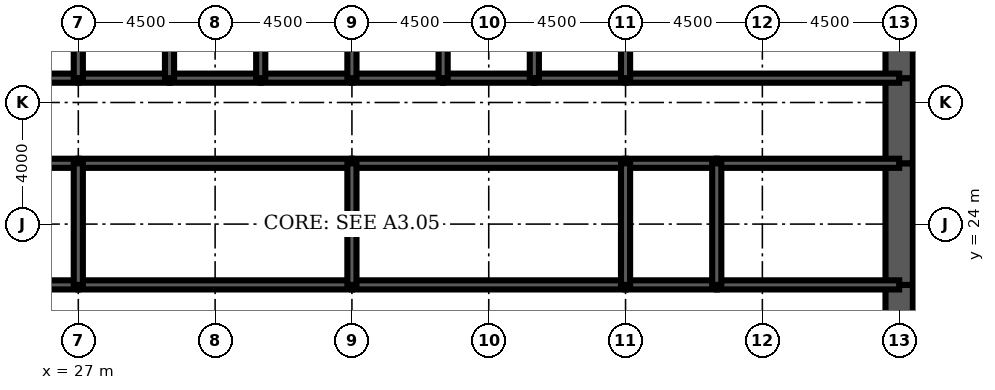
"""IFC4 building model, lengths in metres.
Left out: names, types, materials, properties, quantities, classifications, styles, units other than length and angle.
Written with IfcOpenShell. Run it as: python <this file> out.ifc"""

import sys

from ifc_helpers import new_model, si_unit, direction, frame, frame_2d, origin, place, context, subcontext, project, spatial, rectangle, extrude, element, fill, save


model = new_model("IFC4")
c1 = context("Model", 3, precision=1e-05, world=origin(), true_north=direction((0.0, 1.0)))
c2 = subcontext(c1, "Body", "Model", "MODEL_VIEW")
j1 = project(units=[si_unit("LENGTHUNIT", "METRE"), si_unit("PLANEANGLEUNIT", "RADIAN")], contexts=[c1])
p1 = place(None, origin())
s1 = spatial("IfcSite", under=j1, at=p1, CompositionType="ELEMENT")
p2 = place(p1, origin())
s2 = spatial("IfcBuilding", under=s1, at=p2, CompositionType="ELEMENT")
p3 = place(p2, frame((0.0, 0.0, 18.0)))
s3 = spatial("IfcBuildingStorey", under=s2, at=p3, CompositionType="ELEMENT", Elevation=18.0)
p4 = place(p3, frame((54.0, 19.2, 0.0), z_axis=(0.0, 0.0, 1.0), x_axis=(0.0, 1.0, 0.0)))
e1 = element("IfcWall", 1, at=p4, inside=s3, PredefinedType="SHEAR", context=c2, shape_type="SweptSolid", body=[
    extrude(rectangle(XDim=2.8, YDim=0.9, at=frame_2d((1.4, 0.0))), origin(), (0.0, 0.0, 1.0), 5.0),
])
p5 = place(p4, frame((0.4, 0.0, 0.0)))
e2 = element("IfcOpeningElement", 2, at=p5, cuts=e1, PredefinedType="OPENING", context=c2, shape_type="SweptSolid", body=[
    extrude(rectangle(XDim=1.8, YDim=2.1, at=frame_2d((0.9, 1.05))), frame((0.0, 0.46, 0.0), z_axis=(0.0, -1.0, 0.0), x_axis=(1.0, 0.0, 0.0)), (0.0, 0.0, 1.0), 0.92),
])
p6 = place(p3, frame((54.0, 22.0, 0.0), z_axis=(0.0, 0.0, 1.0), x_axis=(0.0, 1.0, 0.0)))
e3 = element("IfcWall", 3, at=p6, inside=s3, PredefinedType="SHEAR", context=c2, shape_type="SweptSolid", body=[
    extrude(rectangle(XDim=4.0, YDim=0.9, at=frame_2d((2.0, 0.0))), origin(), (0.0, 0.0, 1.0), 5.0),
])
p7 = place(p3, frame((54.0, 26.0, 0.0), z_axis=(0.0, 0.0, 1.0), x_axis=(0.0, 1.0, 0.0)))
e4 = element("IfcWall", 4, at=p7, inside=s3, PredefinedType="SHEAR", context=c2, shape_type="SweptSolid", body=[
    extrude(rectangle(XDim=2.8, YDim=0.9, at=frame_2d((1.4, 0.0))), origin(), (0.0, 0.0, 1.0), 5.0),
])
p8 = place(p7, frame((0.6, 0.0, 0.0)))
e5 = element("IfcOpeningElement", 5, at=p8, cuts=e4, PredefinedType="OPENING", context=c2, shape_type="SweptSolid", body=[
    extrude(rectangle(XDim=1.8, YDim=2.1, at=frame_2d((0.9, 1.05))), frame((0.0, 0.46, 0.0), z_axis=(0.0, -1.0, 0.0), x_axis=(1.0, 0.0, 0.0)), (0.0, 0.0, 1.0), 0.92),
])
p9 = place(p3, frame((54.0, 28.8, 0.0), z_axis=(0.0, 0.0, 1.0), x_axis=(0.0, 1.0, 0.0)))
e6 = element("IfcWall", 6, at=p9, inside=s3, PredefinedType="SHEAR", context=c2, shape_type="SweptSolid", body=[
    extrude(rectangle(XDim=3.2, YDim=0.9, at=frame_2d((1.6, 0.0))), origin(), (0.0, 0.0, 1.0), 5.0),
])
p10 = place(p3, frame((18.0, 28.8, 0.0), z_axis=(0.0, 0.0, 1.0), x_axis=(1.0, 0.0, 0.0)))
e7 = element("IfcWall", 7, at=p10, inside=s3, PredefinedType="SOLIDWALL", context=c2, shape_type="SweptSolid", body=[
    extrude(rectangle(XDim=9.0, YDim=0.3, at=frame_2d((4.5, 0.0))), origin(), (0.0, 0.0, 1.0), 5.0),
])
p11 = place(p10, frame((0.65, 0.0, 0.0)))
e8 = element("IfcOpeningElement", 8, at=p11, cuts=e7, PredefinedType="OPENING", context=c2, shape_type="SweptSolid", body=[
    extrude(rectangle(XDim=1.0, YDim=2.1, at=frame_2d((0.5, 1.05))), frame((0.0, 0.16, 0.0), z_axis=(0.0, -1.0, 0.0), x_axis=(1.0, 0.0, 0.0)), (0.0, 0.0, 1.0), 0.32),
])
p12 = place(p3, frame((27.0, 28.8, 0.0), z_axis=(0.0, 0.0, 1.0), x_axis=(1.0, 0.0, 0.0)))
e9 = element("IfcWall", 9, at=p12, inside=s3, PredefinedType="SOLIDWALL", context=c2, shape_type="SweptSolid", body=[
    extrude(rectangle(XDim=3.0, YDim=0.3, at=frame_2d((1.5, 0.0))), origin(), (0.0, 0.0, 1.0), 5.0),
])
p13 = place(p12, frame((0.95, 0.0, 0.0)))
e10 = element("IfcOpeningElement", 10, at=p13, cuts=e9, PredefinedType="OPENING", context=c2, shape_type="SweptSolid", body=[
    extrude(rectangle(XDim=1.1, YDim=2.2, at=frame_2d((0.55, 1.1))), frame((0.0, 0.16, 0.0), z_axis=(0.0, -1.0, 0.0), x_axis=(1.0, 0.0, 0.0)), (0.0, 0.0, 1.0), 0.32),
])
p14 = place(p3, frame((30.0, 28.8, 0.0), z_axis=(0.0, 0.0, 1.0), x_axis=(1.0, 0.0, 0.0)))
e11 = element("IfcWall", 11, at=p14, inside=s3, PredefinedType="SOLIDWALL", context=c2, shape_type="SweptSolid", body=[
    extrude(rectangle(XDim=3.0, YDim=0.3, at=frame_2d((1.5, 0.0))), origin(), (0.0, 0.0, 1.0), 5.0),
])
p15 = place(p14, frame((0.95, 0.0, 0.0)))
e12 = element("IfcOpeningElement", 12, at=p15, cuts=e11, PredefinedType="OPENING", context=c2, shape_type="SweptSolid", body=[
    extrude(rectangle(XDim=1.1, YDim=2.2, at=frame_2d((0.55, 1.1))), frame((0.0, 0.16, 0.0), z_axis=(0.0, -1.0, 0.0), x_axis=(1.0, 0.0, 0.0)), (0.0, 0.0, 1.0), 0.32),
])
p16 = place(p3, frame((33.0, 28.8, 0.0), z_axis=(0.0, 0.0, 1.0), x_axis=(1.0, 0.0, 0.0)))
e13 = element("IfcWall", 13, at=p16, inside=s3, PredefinedType="SOLIDWALL", context=c2, shape_type="SweptSolid", body=[
    extrude(rectangle(XDim=3.0, YDim=0.3, at=frame_2d((1.5, 0.0))), origin(), (0.0, 0.0, 1.0), 5.0),
])
p17 = place(p16, frame((0.95, 0.0, 0.0)))
e14 = element("IfcOpeningElement", 14, at=p17, cuts=e13, PredefinedType="OPENING", context=c2, shape_type="SweptSolid", body=[
    extrude(rectangle(XDim=1.1, YDim=2.2, at=frame_2d((0.55, 1.1))), frame((0.0, 0.16, 0.0), z_axis=(0.0, -1.0, 0.0), x_axis=(1.0, 0.0, 0.0)), (0.0, 0.0, 1.0), 0.32),
])
for number, where, z_axis, x_axis in (
    (15, (36.0, 28.8, 0.0), (0.0, 0.0, 1.0), (1.0, 0.0, 0.0)),
    (16, (39.0, 28.8, 0.0), (0.0, 0.0, 1.0), (1.0, 0.0, 0.0)),
):
    element("IfcWall", number, at=place(p3, frame(where, z_axis=z_axis, x_axis=x_axis)), inside=s3, PredefinedType="SOLIDWALL", context=c2, shape_type="SweptSolid", body=[
        extrude(rectangle(XDim=3.0, YDim=0.3, at=frame_2d((1.5, 0.0))), origin(), (0.0, 0.0, 1.0), 5.0),
    ])
p18 = place(p3, frame((42.0, 28.8, 0.0), z_axis=(0.0, 0.0, 1.0), x_axis=(1.0, 0.0, 0.0)))
e17 = element("IfcWall", 17, at=p18, inside=s3, PredefinedType="SOLIDWALL", context=c2, shape_type="SweptSolid", body=[
    extrude(rectangle(XDim=3.0, YDim=0.3, at=frame_2d((1.5, 0.0))), origin(), (0.0, 0.0, 1.0), 5.0),
])
p19 = place(p18, frame((0.95, 0.0, 0.0)))
e18 = element("IfcOpeningElement", 18, at=p19, cuts=e17, PredefinedType="OPENING", context=c2, shape_type="SweptSolid", body=[
    extrude(rectangle(XDim=1.1, YDim=2.2, at=frame_2d((0.55, 1.1))), frame((0.0, 0.16, 0.0), z_axis=(0.0, -1.0, 0.0), x_axis=(1.0, 0.0, 0.0)), (0.0, 0.0, 1.0), 0.32),
])
p20 = place(p3, frame((45.0, 28.8, 0.0), z_axis=(0.0, 0.0, 1.0), x_axis=(1.0, 0.0, 0.0)))
e19 = element("IfcWall", 19, at=p20, inside=s3, PredefinedType="SOLIDWALL", context=c2, shape_type="SweptSolid", body=[
    extrude(rectangle(XDim=9.0, YDim=0.3, at=frame_2d((4.5, 0.0))), origin(), (0.0, 0.0, 1.0), 5.0),
])
p21 = place(p20, frame((7.35, 0.0, 0.0)))
e20 = element("IfcOpeningElement", 20, at=p21, cuts=e19, PredefinedType="OPENING", context=c2, shape_type="SweptSolid", body=[
    extrude(rectangle(XDim=1.0, YDim=2.1, at=frame_2d((0.5, 1.05))), frame((0.0, 0.16, 0.0), z_axis=(0.0, -1.0, 0.0), x_axis=(1.0, 0.0, 0.0)), (0.0, 0.0, 1.0), 0.32),
])
p22 = place(p3, frame((24.0, 22.0, 0.0), z_axis=(0.0, 0.0, 1.0), x_axis=(1.0, 0.0, 0.0)))
e21 = element("IfcWall", 21, at=p22, inside=s3, PredefinedType="SOLIDWALL", context=c2, shape_type="SweptSolid", body=[
    extrude(rectangle(XDim=3.0, YDim=0.3, at=frame_2d((1.5, 0.0))), origin(), (0.0, 0.0, 1.0), 5.0),
])
p23 = place(p22, frame((1.0, 0.0, 0.0)))
e22 = element("IfcOpeningElement", 22, at=p23, cuts=e21, PredefinedType="OPENING", context=c2, shape_type="SweptSolid", body=[
    extrude(rectangle(XDim=1.0, YDim=2.1, at=frame_2d((0.5, 1.05))), frame((0.0, 0.16, 0.0), z_axis=(0.0, -1.0, 0.0), x_axis=(1.0, 0.0, 0.0)), (0.0, 0.0, 1.0), 0.32),
])
p24 = place(p3, frame((27.0, 22.0, 0.0), z_axis=(0.0, 0.0, 1.0), x_axis=(1.0, 0.0, 0.0)))
e23 = element("IfcWall", 23, at=p24, inside=s3, PredefinedType="SOLIDWALL", context=c2, shape_type="SweptSolid", body=[
    extrude(rectangle(XDim=9.0, YDim=0.3, at=frame_2d((4.5, 0.0))), origin(), (0.0, 0.0, 1.0), 5.0),
])
p25 = place(p24, frame((4.0, 0.0, 0.0)))
e24 = element("IfcOpeningElement", 24, at=p25, cuts=e23, PredefinedType="OPENING", context=c2, shape_type="SweptSolid", body=[
    extrude(rectangle(XDim=1.0, YDim=2.1, at=frame_2d((0.5, 1.05))), frame((0.0, 0.16, 0.0), z_axis=(0.0, -1.0, 0.0), x_axis=(1.0, 0.0, 0.0)), (0.0, 0.0, 1.0), 0.32),
])
p26 = place(p3, frame((36.0, 22.0, 0.0), z_axis=(0.0, 0.0, 1.0), x_axis=(1.0, 0.0, 0.0)))
e25 = element("IfcWall", 25, at=p26, inside=s3, PredefinedType="SOLIDWALL", context=c2, shape_type="SweptSolid", body=[
    extrude(rectangle(XDim=9.0, YDim=0.3, at=frame_2d((4.5, 0.0))), origin(), (0.0, 0.0, 1.0), 5.0),
])
p27 = place(p26, frame((4.0, 0.0, 0.0)))
e26 = element("IfcOpeningElement", 26, at=p27, cuts=e25, PredefinedType="OPENING", context=c2, shape_type="SweptSolid", body=[
    extrude(rectangle(XDim=1.0, YDim=2.1, at=frame_2d((0.5, 1.05))), frame((0.0, 0.16, 0.0), z_axis=(0.0, -1.0, 0.0), x_axis=(1.0, 0.0, 0.0)), (0.0, 0.0, 1.0), 0.32),
])
p28 = place(p3, frame((45.0, 22.0, 0.0), z_axis=(0.0, 0.0, 1.0), x_axis=(1.0, 0.0, 0.0)))
e27 = element("IfcWall", 27, at=p28, inside=s3, PredefinedType="SOLIDWALL", context=c2, shape_type="SweptSolid", body=[
    extrude(rectangle(XDim=3.0, YDim=0.3, at=frame_2d((1.5, 0.0))), origin(), (0.0, 0.0, 1.0), 5.0),
])
p29 = place(p28, frame((1.0, 0.0, 0.0)))
e28 = element("IfcOpeningElement", 28, at=p29, cuts=e27, PredefinedType="OPENING", context=c2, shape_type="SweptSolid", body=[
    extrude(rectangle(XDim=1.0, YDim=2.1, at=frame_2d((0.5, 1.05))), frame((0.0, 0.16, 0.0), z_axis=(0.0, -1.0, 0.0), x_axis=(1.0, 0.0, 0.0)), (0.0, 0.0, 1.0), 0.32),
])
p30 = place(p3, frame((48.0, 22.0, 0.0), z_axis=(0.0, 0.0, 1.0), x_axis=(1.0, 0.0, 0.0)))
e29 = element("IfcWall", 29, at=p30, inside=s3, PredefinedType="SOLIDWALL", context=c2, shape_type="SweptSolid", body=[
    extrude(rectangle(XDim=6.0, YDim=0.3, at=frame_2d((3.0, 0.0))), origin(), (0.0, 0.0, 1.0), 5.0),
])
p31 = place(p30, frame((2.0, 0.0, 0.0)))
e30 = element("IfcOpeningElement", 30, at=p31, cuts=e29, PredefinedType="OPENING", context=c2, shape_type="SweptSolid", body=[
    extrude(rectangle(XDim=1.0, YDim=2.1, at=frame_2d((0.5, 1.05))), frame((0.0, 0.16, 0.0), z_axis=(0.0, -1.0, 0.0), x_axis=(1.0, 0.0, 0.0)), (0.0, 0.0, 1.0), 0.32),
])
p32 = place(p30, frame((4.0, 0.0, 0.0)))
e31 = element("IfcOpeningElement", 31, at=p32, cuts=e29, PredefinedType="OPENING", context=c2, shape_type="SweptSolid", body=[
    extrude(rectangle(XDim=1.0, YDim=2.1, at=frame_2d((0.5, 1.05))), frame((0.0, 0.16, 0.0), z_axis=(0.0, -1.0, 0.0), x_axis=(1.0, 0.0, 0.0)), (0.0, 0.0, 1.0), 0.32),
])
p33 = place(p3, frame((24.0, 26.0, 0.0), z_axis=(0.0, 0.0, 1.0), x_axis=(1.0, 0.0, 0.0)))
e32 = element("IfcWall", 32, at=p33, inside=s3, PredefinedType="SOLIDWALL", context=c2, shape_type="SweptSolid", body=[
    extrude(rectangle(XDim=3.0, YDim=0.3, at=frame_2d((1.5, 0.0))), origin(), (0.0, 0.0, 1.0), 5.0),
])
for number, where, z_axis, x_axis in (
    (33, (27.0, 26.0, 0.0), (0.0, 0.0, 1.0), (1.0, 0.0, 0.0)),
    (34, (36.0, 26.0, 0.0), (0.0, 0.0, 1.0), (1.0, 0.0, 0.0)),
):
    element("IfcWall", number, at=place(p3, frame(where, z_axis=z_axis, x_axis=x_axis)), inside=s3, PredefinedType="SOLIDWALL", context=c2, shape_type="SweptSolid", body=[
        extrude(rectangle(XDim=9.0, YDim=0.3, at=frame_2d((4.5, 0.0))), origin(), (0.0, 0.0, 1.0), 5.0),
    ])
p34 = place(p3, frame((45.0, 26.0, 0.0), z_axis=(0.0, 0.0, 1.0), x_axis=(1.0, 0.0, 0.0)))
e35 = element("IfcWall", 35, at=p34, inside=s3, PredefinedType="SOLIDWALL", context=c2, shape_type="SweptSolid", body=[
    extrude(rectangle(XDim=3.0, YDim=0.3, at=frame_2d((1.5, 0.0))), origin(), (0.0, 0.0, 1.0), 5.0),
])
p35 = place(p3, frame((48.0, 26.0, 0.0), z_axis=(0.0, 0.0, 1.0), x_axis=(1.0, 0.0, 0.0)))
e36 = element("IfcWall", 36, at=p35, inside=s3, PredefinedType="SOLIDWALL", context=c2, shape_type="SweptSolid", body=[
    extrude(rectangle(XDim=6.0, YDim=0.3, at=frame_2d((3.0, 0.0))), origin(), (0.0, 0.0, 1.0), 5.0),
])
for number, where, z_axis, x_axis in (
    (37, (27.0, 28.8, 0.0), (0.0, 0.0, 1.0), (0.0, 1.0, 0.0)),
    (38, (30.0, 28.8, 0.0), (0.0, 0.0, 1.0), (0.0, 1.0, 0.0)),
    (39, (33.0, 28.8, 0.0), (0.0, 0.0, 1.0), (0.0, 1.0, 0.0)),
    (40, (36.0, 28.8, 0.0), (0.0, 0.0, 1.0), (0.0, 1.0, 0.0)),
    (41, (39.0, 28.8, 0.0), (0.0, 0.0, 1.0), (0.0, 1.0, 0.0)),
    (42, (42.0, 28.8, 0.0), (0.0, 0.0, 1.0), (0.0, 1.0, 0.0)),
    (43, (45.0, 28.8, 0.0), (0.0, 0.0, 1.0), (0.0, 1.0, 0.0)),
):
    element("IfcWall", number, at=place(p3, frame(where, z_axis=z_axis, x_axis=x_axis)), inside=s3, PredefinedType="SOLIDWALL", context=c2, shape_type="SweptSolid", body=[
        extrude(rectangle(XDim=3.2, YDim=0.3, at=frame_2d((1.6, 0.0))), origin(), (0.0, 0.0, 1.0), 5.0),
    ])
for number, where, z_axis, x_axis in (
    (44, (27.0, 22.0, 0.0), (0.0, 0.0, 1.0), (0.0, 1.0, 0.0)),
    (45, (36.0, 22.0, 0.0), (0.0, 0.0, 1.0), (0.0, 1.0, 0.0)),
    (46, (45.0, 22.0, 0.0), (0.0, 0.0, 1.0), (0.0, 1.0, 0.0)),
    (47, (48.0, 22.0, 0.0), (0.0, 0.0, 1.0), (0.0, 1.0, 0.0)),
):
    element("IfcWall", number, at=place(p3, frame(where, z_axis=z_axis, x_axis=x_axis)), inside=s3, PredefinedType="SOLIDWALL", context=c2, shape_type="SweptSolid", body=[
        extrude(rectangle(XDim=4.0, YDim=0.3, at=frame_2d((2.0, 0.0))), origin(), (0.0, 0.0, 1.0), 5.0),
    ])
p36 = place(p3, frame((42.5, 22.15, 0.0), z_axis=(0.0, 0.0, 1.0), x_axis=(0.0, 1.0, 0.0)))
e48 = element("IfcWall", 48, at=p36, inside=s3, PredefinedType="PARTITIONING", context=c2, shape_type="SweptSolid", body=[
    extrude(rectangle(XDim=3.7, YDim=0.15, at=frame_2d((1.85, 0.0))), origin(), (0.0, 0.0, 1.0), 3.0),
])
p37 = place(p36, frame((2.2, 0.0, 0.0)))
e49 = element("IfcOpeningElement", 49, at=p37, cuts=e48, PredefinedType="OPENING", context=c2, shape_type="SweptSolid", body=[
    extrude(rectangle(XDim=1.0, YDim=2.1, at=frame_2d((0.5, 1.05))), frame((0.0, 0.085, 0.0), z_axis=(0.0, -1.0, 0.0), x_axis=(1.0, 0.0, 0.0)), (0.0, 0.0, 1.0), 0.17),
])
p38 = place(p3, frame((51.375, 22.15, 0.0), z_axis=(0.0, 0.0, 1.0), x_axis=(0.0, 1.0, 0.0)))
e50 = element("IfcWall", 50, at=p38, inside=s3, PredefinedType="PARTITIONING", context=c2, shape_type="SweptSolid", body=[
    extrude(rectangle(XDim=3.7, YDim=0.15, at=frame_2d((1.85, 0.0))), origin(), (0.0, 0.0, 1.0), 3.0),
])
p39 = place(p3, frame((46.2, 26.15, 0.0), z_axis=(0.0, 0.0, 1.0), x_axis=(0.0, 1.0, 0.0)))
e51 = element("IfcWall", 51, at=p39, inside=s3, PredefinedType="PARTITIONING", context=c2, shape_type="SweptSolid", body=[
    extrude(rectangle(XDim=2.5, YDim=0.15, at=frame_2d((1.25, 0.0))), origin(), (0.0, 0.0, 1.0), 3.0),
])
p40 = place(p39, frame((1.15, 0.0, 0.0)))
e52 = element("IfcOpeningElement", 52, at=p40, cuts=e51, PredefinedType="OPENING", context=c2, shape_type="SweptSolid", body=[
    extrude(rectangle(XDim=1.0, YDim=2.1, at=frame_2d((0.5, 1.05))), frame((0.0, 0.085, 0.0), z_axis=(0.0, -1.0, 0.0), x_axis=(1.0, 0.0, 0.0)), (0.0, 0.0, 1.0), 0.17),
])
p41 = place(p37, origin())
e53 = element("IfcDoor", 53, at=p41, inside=s3, OperationType="SINGLE_SWING_RIGHT", PredefinedType="DOOR", context=c2, shape_type="SweptSolid", body=[
    extrude(rectangle(XDim=1.0, YDim=2.1, at=frame_2d((0.5, 1.05))), frame((0.0, 0.025, 0.0), z_axis=(0.0, -1.0, 0.0), x_axis=(1.0, 0.0, 0.0)), (0.0, 0.0, 1.0), 0.05),
])
fill(e49, e53)
p42 = place(p40, origin())
e54 = element("IfcDoor", 54, at=p42, inside=s3, OperationType="SINGLE_SWING_RIGHT", PredefinedType="DOOR", context=c2, shape_type="SweptSolid", body=[
    extrude(rectangle(XDim=1.0, YDim=2.1, at=frame_2d((0.5, 1.05))), frame((0.0, 0.025, 0.0), z_axis=(0.0, -1.0, 0.0), x_axis=(1.0, 0.0, 0.0)), (0.0, 0.0, 1.0), 0.05),
])
fill(e52, e54)
p43 = place(p19, origin())
e55 = element("IfcDoor", 55, at=p43, inside=s3, OperationType="DOUBLE_DOOR_SLIDING", PredefinedType="USERDEFINED", context=c2, shape_type="SweptSolid", body=[
    extrude(rectangle(XDim=1.1, YDim=2.2, at=frame_2d((0.55, 1.1))), frame((0.0, 0.025, 0.0), z_axis=(0.0, -1.0, 0.0), x_axis=(1.0, 0.0, 0.0)), (0.0, 0.0, 1.0), 0.05),
])
fill(e18, e55)
p44 = place(p13, origin())
e56 = element("IfcDoor", 56, at=p44, inside=s3, OperationType="DOUBLE_DOOR_SLIDING", PredefinedType="USERDEFINED", context=c2, shape_type="SweptSolid", body=[
    extrude(rectangle(XDim=1.1, YDim=2.2, at=frame_2d((0.55, 1.1))), frame((0.0, 0.025, 0.0), z_axis=(0.0, -1.0, 0.0), x_axis=(1.0, 0.0, 0.0)), (0.0, 0.0, 1.0), 0.05),
])
fill(e10, e56)
p45 = place(p15, origin())
e57 = element("IfcDoor", 57, at=p45, inside=s3, OperationType="DOUBLE_DOOR_SLIDING", PredefinedType="USERDEFINED", context=c2, shape_type="SweptSolid", body=[
    extrude(rectangle(XDim=1.1, YDim=2.2, at=frame_2d((0.55, 1.1))), frame((0.0, 0.025, 0.0), z_axis=(0.0, -1.0, 0.0), x_axis=(1.0, 0.0, 0.0)), (0.0, 0.0, 1.0), 0.05),
])
fill(e12, e57)
p46 = place(p17, origin())
e58 = element("IfcDoor", 58, at=p46, inside=s3, OperationType="DOUBLE_DOOR_SLIDING", PredefinedType="USERDEFINED", context=c2, shape_type="SweptSolid", body=[
    extrude(rectangle(XDim=1.1, YDim=2.2, at=frame_2d((0.55, 1.1))), frame((0.0, 0.025, 0.0), z_axis=(0.0, -1.0, 0.0), x_axis=(1.0, 0.0, 0.0)), (0.0, 0.0, 1.0), 0.05),
])
fill(e14, e58)
p47 = place(p21, origin())
e59 = element("IfcDoor", 59, at=p47, inside=s3, OperationType="SINGLE_SWING_RIGHT", PredefinedType="DOOR", context=c2, shape_type="SweptSolid", body=[
    extrude(rectangle(XDim=1.0, YDim=2.1, at=frame_2d((0.5, 1.05))), frame((0.0, 0.025, 0.0), z_axis=(0.0, -1.0, 0.0), x_axis=(1.0, 0.0, 0.0)), (0.0, 0.0, 1.0), 0.05),
])
fill(e20, e59)
p48 = place(p5, origin())
e60 = element("IfcDoor", 60, at=p48, inside=s3, OperationType="SINGLE_SWING_LEFT", PredefinedType="DOOR", context=c2, shape_type="SweptSolid", body=[
    extrude(rectangle(XDim=1.8, YDim=2.1, at=frame_2d((0.9, 1.05))), frame((0.0, 0.45, 0.0), z_axis=(0.0, -1.0, 0.0), x_axis=(1.0, 0.0, 0.0)), (0.0, 0.0, 1.0), 0.899),
])
fill(e2, e60)
p49 = place(p8, origin())
e61 = element("IfcDoor", 61, at=p49, inside=s3, OperationType="SINGLE_SWING_LEFT", PredefinedType="DOOR", context=c2, shape_type="SweptSolid", body=[
    extrude(rectangle(XDim=1.8, YDim=2.1, at=frame_2d((0.9, 1.05))), frame((0.0, 0.45, 0.0), z_axis=(0.0, -1.0, 0.0), x_axis=(1.0, 0.0, 0.0)), (0.0, 0.0, 1.0), 0.899),
])
fill(e5, e61)
p50 = place(p25, origin())
e62 = element("IfcDoor", 62, at=p50, inside=s3, OperationType="SINGLE_SWING_LEFT", PredefinedType="DOOR", context=c2, shape_type="SweptSolid", body=[
    extrude(rectangle(XDim=1.0, YDim=2.1, at=frame_2d((0.5, 1.05))), frame((0.0, 0.025, 0.0), z_axis=(0.0, -1.0, 0.0), x_axis=(1.0, 0.0, 0.0)), (0.0, 0.0, 1.0), 0.05),
])
fill(e24, e62)
p51 = place(p27, origin())
e63 = element("IfcDoor", 63, at=p51, inside=s3, OperationType="SINGLE_SWING_LEFT", PredefinedType="DOOR", context=c2, shape_type="SweptSolid", body=[
    extrude(rectangle(XDim=1.0, YDim=2.1, at=frame_2d((0.5, 1.05))), frame((0.0, 0.025, 0.0), z_axis=(0.0, -1.0, 0.0), x_axis=(1.0, 0.0, 0.0)), (0.0, 0.0, 1.0), 0.05),
])
fill(e26, e63)
p52 = place(p29, origin())
e64 = element("IfcDoor", 64, at=p52, inside=s3, OperationType="SINGLE_SWING_LEFT", PredefinedType="DOOR", context=c2, shape_type="SweptSolid", body=[
    extrude(rectangle(XDim=1.0, YDim=2.1, at=frame_2d((0.5, 1.05))), frame((0.0, 0.025, 0.0), z_axis=(0.0, -1.0, 0.0), x_axis=(1.0, 0.0, 0.0)), (0.0, 0.0, 1.0), 0.05),
])
fill(e28, e64)
p53 = place(p31, origin())
e65 = element("IfcDoor", 65, at=p53, inside=s3, OperationType="SINGLE_SWING_LEFT", PredefinedType="DOOR", context=c2, shape_type="SweptSolid", body=[
    extrude(rectangle(XDim=1.0, YDim=2.1, at=frame_2d((0.5, 1.05))), frame((0.0, 0.025, 0.0), z_axis=(0.0, -1.0, 0.0), x_axis=(1.0, 0.0, 0.0)), (0.0, 0.0, 1.0), 0.05),
])
fill(e30, e65)
p54 = place(p32, origin())
e66 = element("IfcDoor", 66, at=p54, inside=s3, OperationType="SINGLE_SWING_RIGHT", PredefinedType="DOOR", context=c2, shape_type="SweptSolid", body=[
    extrude(rectangle(XDim=1.0, YDim=2.1, at=frame_2d((0.5, 1.05))), frame((0.0, 0.025, 0.0), z_axis=(0.0, -1.0, 0.0), x_axis=(1.0, 0.0, 0.0)), (0.0, 0.0, 1.0), 0.05),
])
fill(e31, e66)
save(model, sys.argv[1])
